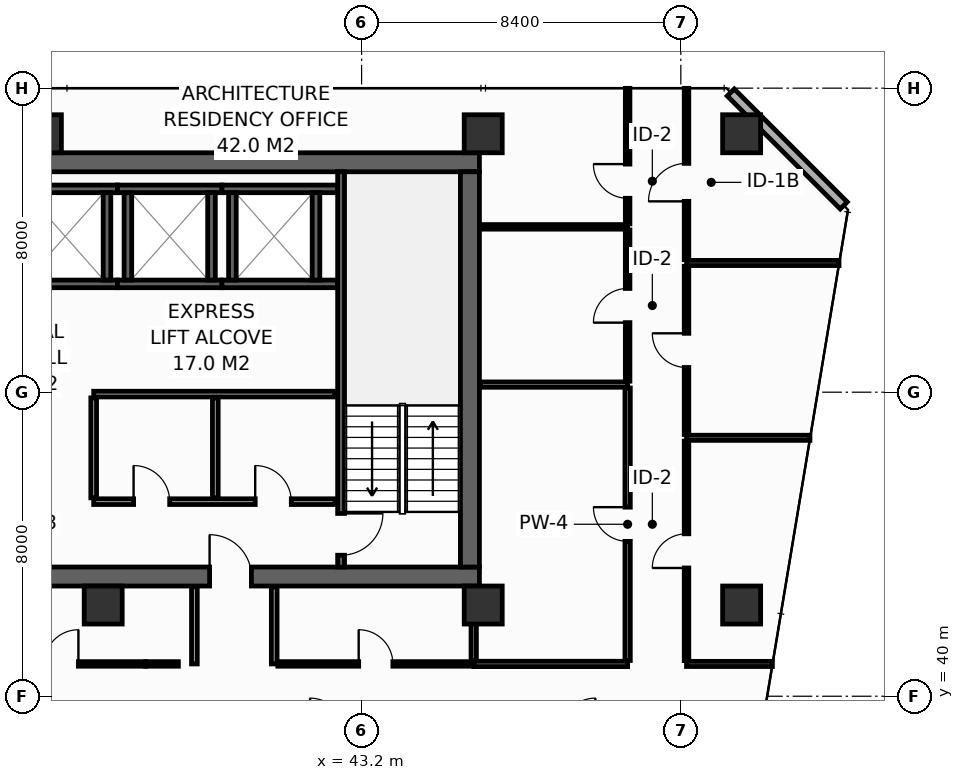
"""IFC4 building model, lengths in metres.
Left out: names, types, materials, properties, quantities, classifications, styles, units other than length and angle.
Written with IfcOpenShell. Run it as: python <this file> out.ifc"""

import sys

from ifc_helpers import new_model, si_unit, direction, frame, frame_2d, origin, origin_2d, place, context, subcontext, project, spatial, rectangle, hollow_rectangle, extrude, element, fill, save


model = new_model("IFC4")
c1 = context("Model", 3, precision=1e-05, world=origin(), true_north=direction((0.0, 1.0)))
c2 = subcontext(c1, "Body", "Model", "MODEL_VIEW")
j1 = project(units=[si_unit("LENGTHUNIT", "METRE"), si_unit("PLANEANGLEUNIT", "RADIAN")], contexts=[c1])
p1 = place(None, origin())
s1 = spatial("IfcSite", under=j1, at=p1, CompositionType="ELEMENT")
p2 = place(p1, origin())
s2 = spatial("IfcBuilding", under=s1, at=p2, CompositionType="ELEMENT")
p3 = place(p2, frame((0.0, 0.0, 163.8)))
s3 = spatial("IfcBuildingStorey", under=s2, at=p3, CompositionType="ELEMENT", Elevation=163.8)
p4 = place(p3, frame((13.6, 43.15, 0.0), z_axis=(0.0, 0.0, 1.0), x_axis=(1.0, 0.0, 0.0)))
e1 = element("IfcWall", 1, at=p4, inside=s3, PredefinedType="SHEAR", context=c2, shape_type="SweptSolid", body=[
    extrude(rectangle(XDim=32.7, YDim=0.5, at=frame_2d((16.35, 0.0))), origin(), (0.0, 0.0, 1.0), 3.55),
])
p5 = place(p4, frame((5.4, 0.0, 0.0)))
e2 = element("IfcOpeningElement", 2, at=p5, cuts=e1, PredefinedType="OPENING", context=c2, shape_type="SweptSolid", body=[
    extrude(rectangle(XDim=1.1, YDim=2.15, at=frame_2d((0.55, 1.075))), frame((0.0, 0.26, 0.0), z_axis=(0.0, -1.0, 0.0), x_axis=(1.0, 0.0, 0.0)), (0.0, 0.0, 1.0), 0.52),
])
p6 = place(p4, frame((25.6, 0.0, 0.0)))
e3 = element("IfcOpeningElement", 3, at=p6, cuts=e1, PredefinedType="OPENING", context=c2, shape_type="SweptSolid", body=[
    extrude(rectangle(XDim=1.1, YDim=2.15, at=frame_2d((0.55, 1.075))), frame((0.0, 0.26, 0.0), z_axis=(0.0, -1.0, 0.0), x_axis=(1.0, 0.0, 0.0)), (0.0, 0.0, 1.0), 0.52),
])
p7 = place(p3, frame((13.6, 54.05, 0.0), z_axis=(0.0, 0.0, 1.0), x_axis=(1.0, 0.0, 0.0)))
e4 = element("IfcWall", 4, at=p7, inside=s3, PredefinedType="SHEAR", context=c2, shape_type="SweptSolid", body=[
    extrude(rectangle(XDim=32.7, YDim=0.5, at=frame_2d((16.35, 0.0))), origin(), (0.0, 0.0, 1.0), 3.55),
])
p8 = place(p3, frame((46.05, 43.4, 0.0), z_axis=(0.0, 0.0, 1.0), x_axis=(0.0, 1.0, 0.0)))
e5 = element("IfcWall", 5, at=p8, inside=s3, PredefinedType="SHEAR", context=c2, shape_type="SweptSolid", body=[
    extrude(rectangle(XDim=10.4, YDim=0.5, at=frame_2d((5.2, 0.0))), origin(), (0.0, 0.0, 1.0), 3.55),
])
for number, where, z_axis, x_axis in (
    (6, (34.8, 54.8, 0.0), (0.0, 0.0, 1.0), (1.0, 0.0, 0.0)),
    (7, (46.4, 54.8, 0.0), (0.0, 0.0, 1.0), (1.0, 0.0, 0.0)),
    (8, (53.2, 54.8, 0.0), (0.0, 0.0, 1.0), (1.0, 0.0, 0.0)),
    (9, (36.4, 42.4, 0.0), (0.0, 0.0, 1.0), (1.0, 0.0, 0.0)),
    (10, (46.4, 42.4, 0.0), (0.0, 0.0, 1.0), (1.0, 0.0, 0.0)),
    (11, (53.2, 42.4, 0.0), (0.0, 0.0, 1.0), (1.0, 0.0, 0.0)),
):
    element("IfcColumn", number, at=place(p3, frame(where, z_axis=z_axis, x_axis=x_axis)), inside=s3, PredefinedType="COLUMN", context=c2, shape_type="SweptSolid", body=[
        extrude(hollow_rectangle(XDim=1.0, YDim=1.0, WallThickness=0.045, at=origin_2d()), origin(), (0.0, 0.0, 1.0), 3.8),
    ])
for number, where, z_axis, x_axis in (
    (12, (34.2, 50.85, 0.0), (0.0, 0.0, 1.0), (1.0, 0.0, 0.0)),
    (13, (34.2, 53.35, 0.0), (0.0, 0.0, 1.0), (1.0, 0.0, 0.0)),
):
    element("IfcWall", number, at=place(p3, frame(where, z_axis=z_axis, x_axis=x_axis)), inside=s3, PredefinedType="SHEAR", context=c2, shape_type="SweptSolid", body=[
        extrude(rectangle(XDim=2.575, YDim=0.2, at=frame_2d((1.288, 0.0))), origin(), (0.0, 0.0, 1.0), 3.55),
    ])
p9 = place(p3, frame((36.5, 50.95, 0.0), z_axis=(0.0, 0.0, 1.0), x_axis=(0.0, 1.0, 0.0)))
e14 = element("IfcWall", 14, at=p9, inside=s3, PredefinedType="SHEAR", context=c2, shape_type="SweptSolid", body=[
    extrude(rectangle(XDim=2.3, YDim=0.2, at=frame_2d((1.15, 0.0))), origin(), (0.0, 0.0, 1.0), 3.55),
])
for number, where, z_axis, x_axis in (
    (15, (36.775, 50.85, 0.0), (0.0, 0.0, 1.0), (1.0, 0.0, 0.0)),
    (16, (36.775, 53.35, 0.0), (0.0, 0.0, 1.0), (1.0, 0.0, 0.0)),
):
    element("IfcWall", number, at=place(p3, frame(where, z_axis=z_axis, x_axis=x_axis)), inside=s3, PredefinedType="SHEAR", context=c2, shape_type="SweptSolid", body=[
        extrude(rectangle(XDim=2.75, YDim=0.2, at=frame_2d((1.375, 0.0))), origin(), (0.0, 0.0, 1.0), 3.55),
    ])
for number, where, z_axis, x_axis in (
    (17, (37.05, 50.95, 0.0), (0.0, 0.0, 1.0), (0.0, 1.0, 0.0)),
    (18, (39.25, 50.95, 0.0), (0.0, 0.0, 1.0), (0.0, 1.0, 0.0)),
):
    element("IfcWall", number, at=place(p3, frame(where, z_axis=z_axis, x_axis=x_axis)), inside=s3, PredefinedType="SHEAR", context=c2, shape_type="SweptSolid", body=[
        extrude(rectangle(XDim=2.3, YDim=0.2, at=frame_2d((1.15, 0.0))), origin(), (0.0, 0.0, 1.0), 3.55),
    ])
for number, where, z_axis, x_axis in (
    (19, (39.525, 50.85, 0.0), (0.0, 0.0, 1.0), (1.0, 0.0, 0.0)),
    (20, (39.525, 53.35, 0.0), (0.0, 0.0, 1.0), (1.0, 0.0, 0.0)),
):
    element("IfcWall", number, at=place(p3, frame(where, z_axis=z_axis, x_axis=x_axis)), inside=s3, PredefinedType="SHEAR", context=c2, shape_type="SweptSolid", body=[
        extrude(rectangle(XDim=3.045, YDim=0.2, at=frame_2d((1.522, 0.0))), origin(), (0.0, 0.0, 1.0), 3.55),
    ])
for number, where, z_axis, x_axis in (
    (21, (39.8, 50.95, 0.0), (0.0, 0.0, 1.0), (0.0, 1.0, 0.0)),
    (22, (42.0, 50.95, 0.0), (0.0, 0.0, 1.0), (0.0, 1.0, 0.0)),
):
    element("IfcWall", number, at=place(p3, frame(where, z_axis=z_axis, x_axis=x_axis)), inside=s3, PredefinedType="SHEAR", context=c2, shape_type="SweptSolid", body=[
        extrude(rectangle(XDim=2.3, YDim=0.2, at=frame_2d((1.15, 0.0))), origin(), (0.0, 0.0, 1.0), 3.55),
    ])
p10 = place(p3, frame((42.66, 53.8, 0.0), z_axis=(0.0, 0.0, 1.0), x_axis=(0.0, -1.0, 0.0)))
e23 = element("IfcWall", 23, at=p10, inside=s3, PredefinedType="SHEAR", context=c2, shape_type="SweptSolid", body=[
    extrude(rectangle(XDim=10.4, YDim=0.18, at=frame_2d((5.2, 0.0))), origin(), (0.0, 0.0, 1.0), 3.55),
])
p11 = place(p10, frame((8.99, 0.0, 0.0)))
e24 = element("IfcOpeningElement", 24, at=p11, cuts=e23, PredefinedType="OPENING", context=c2, shape_type="SweptSolid", body=[
    extrude(rectangle(XDim=1.1, YDim=2.15, at=frame_2d((0.55, 1.075))), frame((0.0, 0.1, 0.0), z_axis=(0.0, -1.0, 0.0), x_axis=(1.0, 0.0, 0.0)), (0.0, 0.0, 1.0), 0.2),
])
p12 = place(p3, frame((36.15, 45.12, 0.0), z_axis=(0.0, 0.0, 1.0), x_axis=(1.0, 0.0, 0.0)))
e25 = element("IfcWall", 25, at=p12, inside=s3, PredefinedType="PARTITIONING", context=c2, shape_type="SweptSolid", body=[
    extrude(rectangle(XDim=6.35, YDim=0.15, at=frame_2d((3.175, 0.0))), origin(), (0.0, 0.0, 1.0), 3.55),
])
p13 = place(p12, frame((1.05, 0.0, 0.0)))
e26 = element("IfcOpeningElement", 26, at=p13, cuts=e25, PredefinedType="OPENING", context=c2, shape_type="SweptSolid", body=[
    extrude(rectangle(XDim=0.95, YDim=2.15, at=frame_2d((0.475, 1.075))), frame((0.0, 0.085, 0.0), z_axis=(0.0, -1.0, 0.0), x_axis=(1.0, 0.0, 0.0)), (0.0, 0.0, 1.0), 0.17),
])
p14 = place(p12, frame((4.25, 0.0, 0.0)))
e27 = element("IfcOpeningElement", 27, at=p14, cuts=e25, PredefinedType="OPENING", context=c2, shape_type="SweptSolid", body=[
    extrude(rectangle(XDim=0.95, YDim=2.15, at=frame_2d((0.475, 1.075))), frame((0.0, 0.085, 0.0), z_axis=(0.0, -1.0, 0.0), x_axis=(1.0, 0.0, 0.0)), (0.0, 0.0, 1.0), 0.17),
])
p15 = place(p3, frame((36.15, 47.95, 0.0), z_axis=(0.0, 0.0, 1.0), x_axis=(1.0, 0.0, 0.0)))
e28 = element("IfcWall", 28, at=p15, inside=s3, PredefinedType="PARTITIONING", context=c2, shape_type="SweptSolid", body=[
    extrude(rectangle(XDim=6.35, YDim=0.15, at=frame_2d((3.175, 0.0))), origin(), (0.0, 0.0, 1.0), 3.55),
])
for number, where, z_axis, x_axis in (
    (29, (36.15, 45.22, 0.0), (0.0, 0.0, 1.0), (0.0, 1.0, 0.0)),
    (30, (39.35, 45.22, 0.0), (0.0, 0.0, 1.0), (0.0, 1.0, 0.0)),
):
    element("IfcWall", number, at=place(p3, frame(where, z_axis=z_axis, x_axis=x_axis)), inside=s3, PredefinedType="PARTITIONING", context=c2, shape_type="SweptSolid", body=[
        extrude(rectangle(XDim=2.63, YDim=0.15, at=frame_2d((1.315, 0.0))), origin(), (0.0, 0.0, 1.0), 3.55),
    ])
p16 = place(p3, frame((55.887, 52.913, 0.0), z_axis=(0.0, 0.0, 1.0), x_axis=(-0.707106781187, 0.707106781187, 0.0)))
e31 = element("IfcWall", 31, at=p16, inside=s3, PredefinedType="STANDARD", context=c2, shape_type="SweptSolid", body=[
    extrude(rectangle(XDim=4.206, YDim=0.26, at=frame_2d((2.103, 0.0))), origin(), (0.0, 0.0, 1.0), 3.55),
])
p17 = place(p3, frame((46.15, 40.85, 0.0), z_axis=(0.0, 0.0, 1.0), x_axis=(1.0, 0.0, 0.0)))
e32 = element("IfcWall", 32, at=p17, inside=s3, PredefinedType="PARTITIONING", context=c2, shape_type="SweptSolid", body=[
    extrude(rectangle(XDim=4.05, YDim=0.14, at=frame_2d((2.025, 0.0))), origin(), (0.0, 0.0, 1.0), 3.55),
])
p18 = place(p3, frame((46.15, 40.94, 0.0), z_axis=(0.0, 0.0, 1.0), x_axis=(0.0, 1.0, 0.0)))
e33 = element("IfcWall", 33, at=p18, inside=s3, PredefinedType="PARTITIONING", context=c2, shape_type="SweptSolid", body=[
    extrude(rectangle(XDim=1.94, YDim=0.14, at=frame_2d((0.97, 0.0))), origin(), (0.0, 0.0, 1.0), 3.55),
])
p19 = place(p3, frame((46.32, 48.2, 0.0), z_axis=(0.0, 0.0, 1.0), x_axis=(1.0, 0.0, 0.0)))
e34 = element("IfcWall", 34, at=p19, inside=s3, PredefinedType="PARTITIONING", context=c2, shape_type="SweptSolid", body=[
    extrude(rectangle(XDim=3.88, YDim=0.14, at=frame_2d((1.94, 0.0))), origin(), (0.0, 0.0, 1.0), 3.55),
])
p20 = place(p3, frame((50.2, 40.94, 0.0), z_axis=(0.0, 0.0, 1.0), x_axis=(0.0, 1.0, 0.0)))
e35 = element("IfcWall", 35, at=p20, inside=s3, PredefinedType="PARTITIONING", context=c2, shape_type="SweptSolid", body=[
    extrude(rectangle(XDim=7.17, YDim=0.14, at=frame_2d((3.585, 0.0))), origin(), (0.0, 0.0, 1.0), 2.835),
])
p21 = place(p20, frame((3.135, 0.0, 0.0)))
e36 = element("IfcOpeningElement", 36, at=p21, cuts=e35, PredefinedType="OPENING", context=c2, shape_type="SweptSolid", body=[
    extrude(rectangle(XDim=0.9, YDim=2.1, at=frame_2d((0.45, 1.05))), frame((0.0, 0.08, 0.0), z_axis=(0.0, -1.0, 0.0), x_axis=(1.0, 0.0, 0.0)), (0.0, 0.0, 1.0), 0.16),
])
p22 = place(p3, frame((46.32, 52.35, 0.0), z_axis=(0.0, 0.0, 1.0), x_axis=(1.0, 0.0, 0.0)))
e37 = element("IfcWall", 37, at=p22, inside=s3, PredefinedType="PARTITIONING", context=c2, shape_type="SweptSolid", body=[
    extrude(rectangle(XDim=3.88, YDim=0.12, at=frame_2d((1.94, 0.0))), origin(), (0.0, 0.0, 1.0), 3.55),
])
p23 = place(p3, frame((50.2, 48.29, 0.0), z_axis=(0.0, 0.0, 1.0), x_axis=(0.0, 1.0, 0.0)))
e38 = element("IfcWall", 38, at=p23, inside=s3, PredefinedType="PARTITIONING", context=c2, shape_type="SweptSolid", body=[
    extrude(rectangle(XDim=3.98, YDim=0.12, at=frame_2d((1.99, 0.0))), origin(), (0.0, 0.0, 1.0), 3.55),
])
p24 = place(p23, frame((1.54, 0.0, 0.0)))
e39 = element("IfcOpeningElement", 39, at=p24, cuts=e38, PredefinedType="OPENING", context=c2, shape_type="SweptSolid", body=[
    extrude(rectangle(XDim=0.9, YDim=2.1, at=frame_2d((0.45, 1.05))), frame((0.0, 0.07, 0.0), z_axis=(0.0, -1.0, 0.0), x_axis=(1.0, 0.0, 0.0)), (0.0, 0.0, 1.0), 0.14),
])
p25 = place(p3, frame((50.2, 52.43, 0.0), z_axis=(0.0, 0.0, 1.0), x_axis=(0.0, 1.0, 0.0)))
e40 = element("IfcWall", 40, at=p25, inside=s3, PredefinedType="PARTITIONING", context=c2, shape_type="SweptSolid", body=[
    extrude(rectangle(XDim=3.565, YDim=0.12, at=frame_2d((1.783, 0.0))), origin(), (0.0, 0.0, 1.0), 2.935),
])
p26 = place(p25, frame((0.672, 0.0, 0.0)))
e41 = element("IfcOpeningElement", 41, at=p26, cuts=e40, PredefinedType="OPENING", context=c2, shape_type="SweptSolid", body=[
    extrude(rectangle(XDim=0.9, YDim=2.1, at=frame_2d((0.45, 1.05))), frame((0.0, 0.07, 0.0), z_axis=(0.0, -1.0, 0.0), x_axis=(1.0, 0.0, 0.0)), (0.0, 0.0, 1.0), 0.14),
])
p27 = place(p3, frame((51.75, 40.85, 0.0), z_axis=(0.0, 0.0, 1.0), x_axis=(1.0, 0.0, 0.0)))
e42 = element("IfcWall", 42, at=p27, inside=s3, PredefinedType="PARTITIONING", context=c2, shape_type="SweptSolid", body=[
    extrude(rectangle(XDim=2.258, YDim=0.135, at=frame_2d((1.129, 0.0))), origin(), (0.0, 0.0, 1.0), 3.035),
])
p28 = place(p3, frame((51.75, 46.8, 0.0), z_axis=(0.0, 0.0, 1.0), x_axis=(1.0, 0.0, 0.0)))
e43 = element("IfcWall", 43, at=p28, inside=s3, PredefinedType="PARTITIONING", context=c2, shape_type="SweptSolid", body=[
    extrude(rectangle(XDim=3.247, YDim=0.135, at=frame_2d((1.624, 0.0))), origin(), (0.0, 0.0, 1.0), 2.835),
])
p29 = place(p3, frame((51.75, 51.4, 0.0), z_axis=(0.0, 0.0, 1.0), x_axis=(1.0, 0.0, 0.0)))
e44 = element("IfcWall", 44, at=p29, inside=s3, PredefinedType="PARTITIONING", context=c2, shape_type="SweptSolid", body=[
    extrude(rectangle(XDim=4.012, YDim=0.135, at=frame_2d((2.006, 0.0))), origin(), (0.0, 0.0, 1.0), 2.835),
])
p30 = place(p3, frame((51.75, 40.938, 0.0), z_axis=(0.0, 0.0, 1.0), x_axis=(0.0, 1.0, 0.0)))
e45 = element("IfcWall", 45, at=p30, inside=s3, PredefinedType="PARTITIONING", context=c2, shape_type="SweptSolid", body=[
    extrude(rectangle(XDim=5.775, YDim=0.12, at=frame_2d((2.887, 0.0))), origin(), (0.0, 0.0, 1.0), 2.835),
])
p31 = place(p30, frame((2.437, 0.0, 0.0)))
e46 = element("IfcOpeningElement", 46, at=p31, cuts=e45, PredefinedType="OPENING", context=c2, shape_type="SweptSolid", body=[
    extrude(rectangle(XDim=0.9, YDim=2.1, at=frame_2d((0.45, 1.05))), frame((0.0, 0.07, 0.0), z_axis=(0.0, -1.0, 0.0), x_axis=(1.0, 0.0, 0.0)), (0.0, 0.0, 1.0), 0.14),
])
p32 = place(p3, frame((51.75, 46.887, 0.0), z_axis=(0.0, 0.0, 1.0), x_axis=(0.0, 1.0, 0.0)))
e47 = element("IfcWall", 47, at=p32, inside=s3, PredefinedType="PARTITIONING", context=c2, shape_type="SweptSolid", body=[
    extrude(rectangle(XDim=4.425, YDim=0.12, at=frame_2d((2.212, 0.0))), origin(), (0.0, 0.0, 1.0), 3.55),
])
p33 = place(p32, frame((1.762, 0.0, 0.0)))
e48 = element("IfcOpeningElement", 48, at=p33, cuts=e47, PredefinedType="OPENING", context=c2, shape_type="SweptSolid", body=[
    extrude(rectangle(XDim=0.9, YDim=2.1, at=frame_2d((0.45, 1.05))), frame((0.0, 0.07, 0.0), z_axis=(0.0, -1.0, 0.0), x_axis=(1.0, 0.0, 0.0)), (0.0, 0.0, 1.0), 0.14),
])
p34 = place(p3, frame((51.75, 51.488, 0.0), z_axis=(0.0, 0.0, 1.0), x_axis=(0.0, 1.0, 0.0)))
e49 = element("IfcWall", 49, at=p34, inside=s3, PredefinedType="PARTITIONING", context=c2, shape_type="SweptSolid", body=[
    extrude(rectangle(XDim=4.508, YDim=0.12, at=frame_2d((2.254, 0.0))), origin(), (0.0, 0.0, 1.0), 2.935),
])
p35 = place(p34, frame((1.534, 0.0, 0.0)))
e50 = element("IfcOpeningElement", 50, at=p35, cuts=e49, PredefinedType="OPENING", context=c2, shape_type="SweptSolid", body=[
    extrude(rectangle(XDim=1.0, YDim=2.15, at=frame_2d((0.5, 1.075))), frame((0.0, 0.07, 0.0), z_axis=(0.0, -1.0, 0.0), x_axis=(1.0, 0.0, 0.0)), (0.0, 0.0, 1.0), 0.14),
])
for number, where, z_axis, x_axis in (
    (51, (38.8, 40.85, 0.0), (0.0, 0.0, 1.0), (0.0, 1.0, 0.0)),
    (52, (40.9, 40.85, 0.0), (0.0, 0.0, 1.0), (0.0, 1.0, 0.0)),
):
    element("IfcWall", number, at=place(p3, frame(where, z_axis=z_axis, x_axis=x_axis)), inside=s3, PredefinedType="PARTITIONING", context=c2, shape_type="SweptSolid", body=[
        extrude(rectangle(XDim=2.03, YDim=0.15, at=frame_2d((1.015, 0.0))), origin(), (0.0, 0.0, 1.0), 3.55),
    ])
p36 = place(p3, frame((33.08, 40.85, 0.0), z_axis=(0.0, 0.0, 1.0), x_axis=(1.0, 0.0, 0.0)))
e53 = element("IfcWall", 53, at=p36, inside=s3, PredefinedType="PARTITIONING", context=c2, shape_type="SweptSolid", body=[
    extrude(rectangle(XDim=4.436, YDim=0.12, at=frame_2d((2.218, 0.0))), origin(), (0.0, 0.0, 1.0), 3.55),
])
p37 = place(p36, frame((1.768, 0.0, 0.0)))
e54 = element("IfcOpeningElement", 54, at=p37, cuts=e53, PredefinedType="OPENING", context=c2, shape_type="SweptSolid", body=[
    extrude(rectangle(XDim=0.9, YDim=2.1, at=frame_2d((0.45, 1.05))), frame((0.0, 0.07, 0.0), z_axis=(0.0, -1.0, 0.0), x_axis=(1.0, 0.0, 0.0)), (0.0, 0.0, 1.0), 0.14),
])
p38 = place(p3, frame((37.516, 40.85, 0.0), z_axis=(0.0, 0.0, 1.0), x_axis=(1.0, 0.0, 0.0)))
e55 = element("IfcWall", 55, at=p38, inside=s3, PredefinedType="PARTITIONING", context=c2, shape_type="SweptSolid", body=[
    extrude(rectangle(XDim=0.862, YDim=0.12, at=frame_2d((0.431, 0.0))), origin(), (0.0, 0.0, 1.0), 2.135),
])
p39 = place(p3, frame((40.995, 40.85, 0.0), z_axis=(0.0, 0.0, 1.0), x_axis=(1.0, 0.0, 0.0)))
e56 = element("IfcWall", 56, at=p39, inside=s3, PredefinedType="PARTITIONING", context=c2, shape_type="SweptSolid", body=[
    extrude(rectangle(XDim=5.155, YDim=0.12, at=frame_2d((2.577, 0.0))), origin(), (0.0, 0.0, 1.0), 3.55),
])
p40 = place(p39, frame((2.128, 0.0, 0.0)))
e57 = element("IfcOpeningElement", 57, at=p40, cuts=e56, PredefinedType="OPENING", context=c2, shape_type="SweptSolid", body=[
    extrude(rectangle(XDim=0.9, YDim=2.1, at=frame_2d((0.45, 1.05))), frame((0.0, 0.07, 0.0), z_axis=(0.0, -1.0, 0.0), x_axis=(1.0, 0.0, 0.0)), (0.0, 0.0, 1.0), 0.14),
])
p41 = place(p11, origin())
e58 = element("IfcDoor", 58, at=p41, inside=s3, OperationType="SINGLE_SWING_LEFT", PredefinedType="DOOR", context=c2, shape_type="SweptSolid", body=[
    extrude(rectangle(XDim=1.1, YDim=2.15, at=frame_2d((0.55, 1.075))), frame((0.0, 0.025, 0.0), z_axis=(0.0, -1.0, 0.0), x_axis=(1.0, 0.0, 0.0)), (0.0, 0.0, 1.0), 0.05),
])
fill(e24, e58)
p42 = place(p6, origin())
e59 = element("IfcDoor", 59, at=p42, inside=s3, OperationType="SINGLE_SWING_LEFT", PredefinedType="DOOR", context=c2, shape_type="SweptSolid", body=[
    extrude(rectangle(XDim=1.1, YDim=2.15, at=frame_2d((0.55, 1.075))), frame((0.0, 0.025, 0.0), z_axis=(0.0, -1.0, 0.0), x_axis=(1.0, 0.0, 0.0)), (0.0, 0.0, 1.0), 0.05),
])
fill(e3, e59)
p43 = place(p13, origin())
e60 = element("IfcDoor", 60, at=p43, inside=s3, OperationType="SINGLE_SWING_LEFT", PredefinedType="DOOR", context=c2, shape_type="SweptSolid", body=[
    extrude(rectangle(XDim=0.95, YDim=2.15, at=frame_2d((0.475, 1.075))), frame((0.0, 0.025, 0.0), z_axis=(0.0, -1.0, 0.0), x_axis=(1.0, 0.0, 0.0)), (0.0, 0.0, 1.0), 0.05),
])
fill(e26, e60)
p44 = place(p14, origin())
e61 = element("IfcDoor", 61, at=p44, inside=s3, OperationType="SINGLE_SWING_LEFT", PredefinedType="DOOR", context=c2, shape_type="SweptSolid", body=[
    extrude(rectangle(XDim=0.95, YDim=2.15, at=frame_2d((0.475, 1.075))), frame((0.0, 0.025, 0.0), z_axis=(0.0, -1.0, 0.0), x_axis=(1.0, 0.0, 0.0)), (0.0, 0.0, 1.0), 0.05),
])
fill(e27, e61)
p45 = place(p21, origin())
e62 = element("IfcDoor", 62, at=p45, inside=s3, OperationType="SINGLE_SWING_RIGHT", PredefinedType="DOOR", context=c2, shape_type="SweptSolid", body=[
    extrude(rectangle(XDim=0.9, YDim=2.1, at=frame_2d((0.45, 1.05))), frame((0.0, 0.025, 0.0), z_axis=(0.0, -1.0, 0.0), x_axis=(1.0, 0.0, 0.0)), (0.0, 0.0, 1.0), 0.05),
])
fill(e36, e62)
p46 = place(p24, origin())
e63 = element("IfcDoor", 63, at=p46, inside=s3, OperationType="SINGLE_SWING_LEFT", PredefinedType="DOOR", context=c2, shape_type="SweptSolid", body=[
    extrude(rectangle(XDim=0.9, YDim=2.1, at=frame_2d((0.45, 1.05))), frame((0.0, 0.025, 0.0), z_axis=(0.0, -1.0, 0.0), x_axis=(1.0, 0.0, 0.0)), (0.0, 0.0, 1.0), 0.05),
])
fill(e39, e63)
p47 = place(p26, origin())
e64 = element("IfcDoor", 64, at=p47, inside=s3, OperationType="SINGLE_SWING_RIGHT", PredefinedType="DOOR", context=c2, shape_type="SweptSolid", body=[
    extrude(rectangle(XDim=0.9, YDim=2.1, at=frame_2d((0.45, 1.05))), frame((0.0, 0.025, 0.0), z_axis=(0.0, -1.0, 0.0), x_axis=(1.0, 0.0, 0.0)), (0.0, 0.0, 1.0), 0.05),
])
fill(e41, e64)
p48 = place(p31, origin())
e65 = element("IfcDoor", 65, at=p48, inside=s3, OperationType="SINGLE_SWING_LEFT", PredefinedType="DOOR", context=c2, shape_type="SweptSolid", body=[
    extrude(rectangle(XDim=0.9, YDim=2.1, at=frame_2d((0.45, 1.05))), frame((0.0, 0.025, 0.0), z_axis=(0.0, -1.0, 0.0), x_axis=(1.0, 0.0, 0.0)), (0.0, 0.0, 1.0), 0.05),
])
fill(e46, e65)
p49 = place(p33, origin())
e66 = element("IfcDoor", 66, at=p49, inside=s3, OperationType="SINGLE_SWING_RIGHT", PredefinedType="DOOR", context=c2, shape_type="SweptSolid", body=[
    extrude(rectangle(XDim=0.9, YDim=2.1, at=frame_2d((0.45, 1.05))), frame((0.0, 0.025, 0.0), z_axis=(0.0, -1.0, 0.0), x_axis=(1.0, 0.0, 0.0)), (0.0, 0.0, 1.0), 0.05),
])
fill(e48, e66)
p50 = place(p35, origin())
e67 = element("IfcDoor", 67, at=p50, inside=s3, OperationType="SINGLE_SWING_LEFT", PredefinedType="DOOR", context=c2, shape_type="SweptSolid", body=[
    extrude(rectangle(XDim=1.0, YDim=2.15, at=frame_2d((0.5, 1.075))), frame((0.0, 0.025, 0.0), z_axis=(0.0, -1.0, 0.0), x_axis=(1.0, 0.0, 0.0)), (0.0, 0.0, 1.0), 0.05),
])
fill(e50, e67)
p51 = place(p37, origin())
e68 = element("IfcDoor", 68, at=p51, inside=s3, OperationType="SINGLE_SWING_RIGHT", PredefinedType="DOOR", context=c2, shape_type="SweptSolid", body=[
    extrude(rectangle(XDim=0.9, YDim=2.1, at=frame_2d((0.45, 1.05))), frame((0.0, 0.025, 0.0), z_axis=(0.0, -1.0, 0.0), x_axis=(1.0, 0.0, 0.0)), (0.0, 0.0, 1.0), 0.05),
])
fill(e54, e68)
p52 = place(p40, origin())
e69 = element("IfcDoor", 69, at=p52, inside=s3, OperationType="SINGLE_SWING_LEFT", PredefinedType="DOOR", context=c2, shape_type="SweptSolid", body=[
    extrude(rectangle(XDim=0.9, YDim=2.1, at=frame_2d((0.45, 1.05))), frame((0.0, 0.025, 0.0), z_axis=(0.0, -1.0, 0.0), x_axis=(1.0, 0.0, 0.0)), (0.0, 0.0, 1.0), 0.05),
])
fill(e57, e69)
save(model, sys.argv[1])
